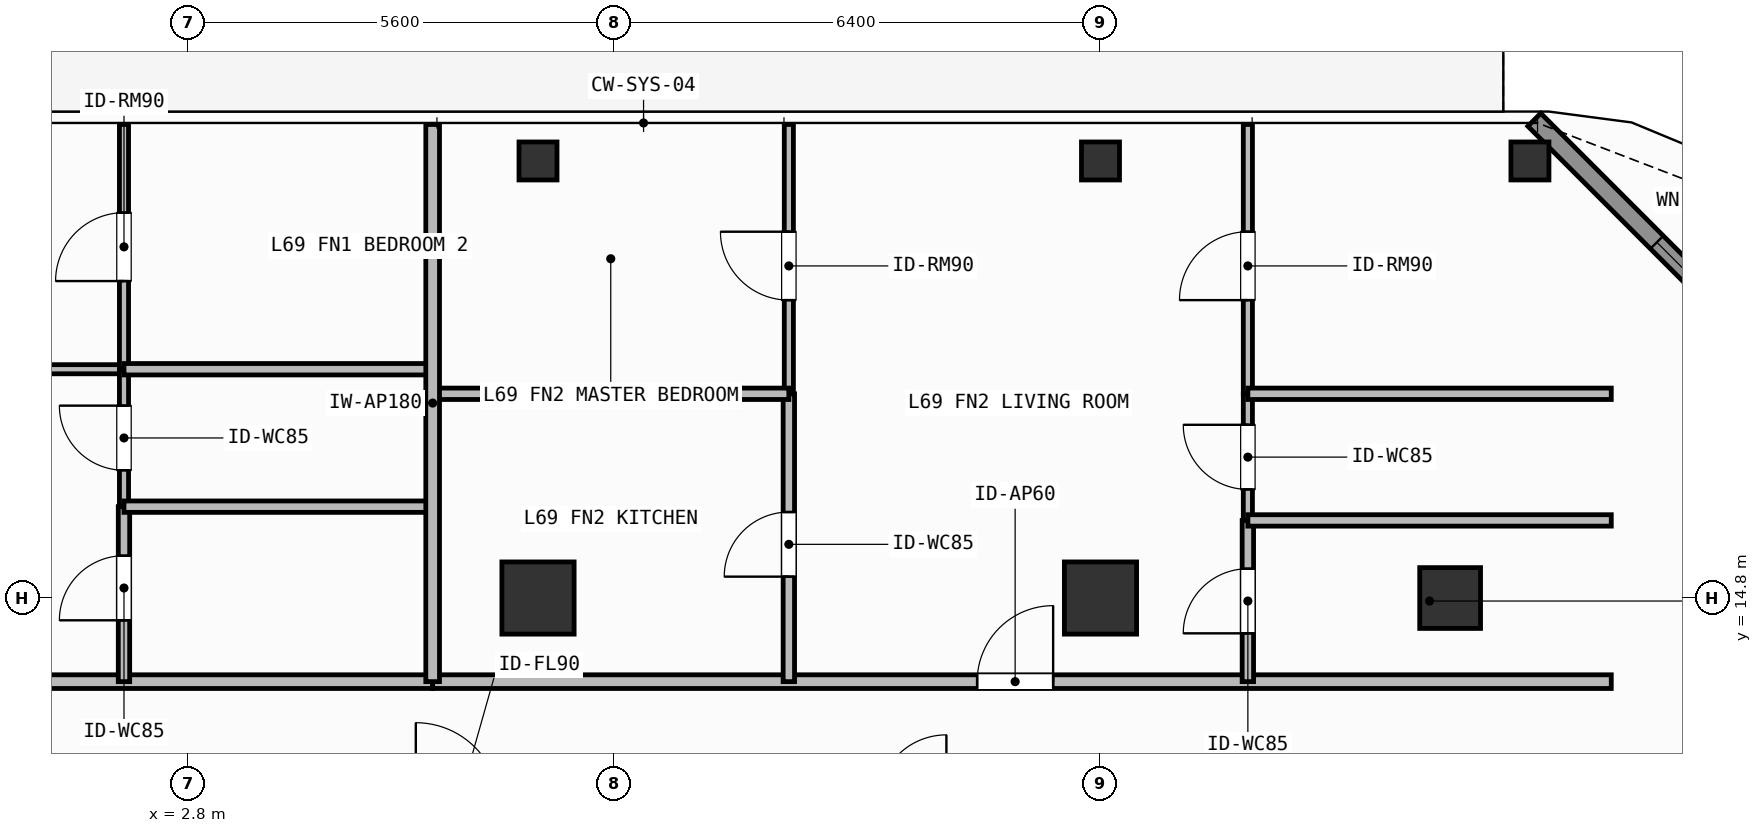
"""IFC4 building model, lengths in metres.
Left out: names, types, materials, properties, quantities, classifications, styles, units other than length and angle.
Written with IfcOpenShell. Run it as: python <this file> out.ifc"""

import sys

from ifc_helpers import new_model, si_unit, direction, frame, frame_2d, origin, origin_2d, place, context, subcontext, project, spatial, rectangle, hollow_rectangle, extrude, element, fill, save


model = new_model("IFC4")
c1 = context("Model", 3, precision=1e-05, world=origin(), true_north=direction((0.0, 1.0)))
c2 = subcontext(c1, "Body", "Model", "MODEL_VIEW")
j1 = project(units=[si_unit("LENGTHUNIT", "METRE"), si_unit("PLANEANGLEUNIT", "RADIAN")], contexts=[c1])
p1 = place(None, origin())
s1 = spatial("IfcSite", under=j1, at=p1, CompositionType="ELEMENT")
p2 = place(p1, origin())
s2 = spatial("IfcBuilding", under=s1, at=p2, CompositionType="ELEMENT")
p3 = place(p2, frame((0.0, 0.0, 282.0)))
s3 = spatial("IfcBuildingStorey", under=s2, at=p3, CompositionType="ELEMENT", Elevation=282.0)
for number, where, z_axis, x_axis in (
    (1, (7.4, 14.8, 0.0), (0.0, 0.0, 1.0), (1.0, 0.0, 0.0)),
    (2, (14.8, 14.8, 0.0), (0.0, 0.0, 1.0), (1.0, 0.0, 0.0)),
):
    element("IfcColumn", number, at=place(p3, frame(where, z_axis=z_axis, x_axis=x_axis)), inside=s3, PredefinedType="COLUMN", context=c2, shape_type="SweptSolid", body=[
        extrude(rectangle(XDim=0.95, YDim=0.95, at=origin_2d()), origin(), (0.0, 0.0, 1.0), 3.9),
    ])
p4 = place(p3, frame((19.4, 14.8, 0.0), z_axis=(0.0, 0.0, 1.0), x_axis=(1.0, 0.0, 0.0)))
e3 = element("IfcColumn", 3, at=p4, inside=s3, PredefinedType="COLUMN", context=c2, shape_type="SweptSolid", body=[
    extrude(hollow_rectangle(XDim=0.8, YDim=0.8, WallThickness=0.036, at=origin_2d()), origin(), (0.0, 0.0, 1.0), 3.9),
])
for number, where, z_axis, x_axis in (
    (4, (20.45, 20.55, 0.0), (0.0, 0.0, 1.0), (1.0, 0.0, 0.0)),
    (5, (7.4, 20.55, 0.0), (0.0, 0.0, 1.0), (1.0, 0.0, 0.0)),
    (6, (14.8, 20.55, 0.0), (0.0, 0.0, 1.0), (1.0, 0.0, 0.0)),
):
    element("IfcColumn", number, at=place(p3, frame(where, z_axis=z_axis, x_axis=x_axis)), inside=s3, PredefinedType="COLUMN", context=c2, shape_type="SweptSolid", body=[
        extrude(hollow_rectangle(XDim=0.5, YDim=0.5, WallThickness=0.025, at=origin_2d()), origin(), (0.0, 0.0, 1.0), 3.9),
    ])
p5 = place(p3, frame((20.508, 21.092, 0.0), z_axis=(0.0, 0.0, 1.0), x_axis=(0.707126925818, -0.707086635981, 0.0)))
e7 = element("IfcWall", 7, at=p5, inside=s3, PredefinedType="SOLIDWALL", context=c2, shape_type="SweptSolid", body=[
    extrude(rectangle(XDim=6.06, YDim=0.24, at=frame_2d((3.03, 0.0))), origin(), (0.0, 0.0, 1.0), 3.62),
])
p6 = place(p5, frame((2.28, 0.0, 0.8)))
e8 = element("IfcOpeningElement", 8, at=p6, cuts=e7, PredefinedType="OPENING", context=c2, shape_type="SweptSolid", body=[
    extrude(rectangle(XDim=1.5, YDim=1.85, at=frame_2d((0.75, 0.925))), frame((0.0, 0.13, 0.0), z_axis=(0.0, -1.0, 0.0), x_axis=(1.0, 0.0, 0.0)), (0.0, 0.0, 1.0), 0.26),
])
p7 = place(p3, frame((-13.72, 13.7, 0.0), z_axis=(0.0, 0.0, 1.0), x_axis=(1.0, 0.0, 0.0)))
e9 = element("IfcWall", 9, at=p7, inside=s3, PredefinedType="PARTITIONING", context=c2, shape_type="SweptSolid", body=[
    extrude(rectangle(XDim=19.734, YDim=0.18, at=frame_2d((9.867, 0.0))), origin(), (0.0, 0.0, 1.0), 3.62),
])
p8 = place(p7, frame((9.456, 0.0, 0.0)))
e10 = element("IfcOpeningElement", 10, at=p8, cuts=e9, PredefinedType="OPENING", context=c2, shape_type="SweptSolid", body=[
    extrude(rectangle(XDim=1.0, YDim=2.2, at=frame_2d((0.5, 1.1))), frame((0.0, 0.1, 0.0), z_axis=(0.0, -1.0, 0.0), x_axis=(1.0, 0.0, 0.0)), (0.0, 0.0, 1.0), 0.2),
])
p9 = place(p3, frame((-9.34, 17.81, 0.0), z_axis=(0.0, 0.0, 1.0), x_axis=(1.0, 0.0, 0.0)))
e11 = element("IfcWall", 11, at=p9, inside=s3, PredefinedType="PARTITIONING", context=c2, shape_type="SweptSolid", body=[
    extrude(rectangle(XDim=11.293, YDim=0.12, at=frame_2d((5.646, 0.0))), origin(), (0.0, 0.0, 1.0), 3.62),
])
p10 = place(p9, frame((5.197, 0.0, 0.0)))
e12 = element("IfcOpeningElement", 12, at=p10, cuts=e11, PredefinedType="OPENING", context=c2, shape_type="SweptSolid", body=[
    extrude(rectangle(XDim=0.9, YDim=2.1, at=frame_2d((0.45, 1.05))), frame((0.0, 0.07, 0.0), z_axis=(0.0, -1.0, 0.0), x_axis=(1.0, 0.0, 0.0)), (0.0, 0.0, 1.0), 0.14),
])
p11 = place(p3, frame((1.953, 13.7, 0.0), z_axis=(0.0, 0.0, 1.0), x_axis=(0.0, 1.0, 0.0)))
e13 = element("IfcWall", 13, at=p11, inside=s3, PredefinedType="PARTITIONING", context=c2, shape_type="SweptSolid", body=[
    extrude(rectangle(XDim=2.302, YDim=0.15, at=frame_2d((1.151, 0.0))), origin(), (0.0, 0.0, 1.0), 3.62),
])
p12 = place(p11, frame((0.807, 0.0, 0.0)))
e14 = element("IfcOpeningElement", 14, at=p12, cuts=e13, PredefinedType="OPENING", context=c2, shape_type="SweptSolid", body=[
    extrude(rectangle(XDim=0.85, YDim=2.1, at=frame_2d((0.425, 1.05))), frame((0.0, 0.085, 0.0), z_axis=(0.0, -1.0, 0.0), x_axis=(1.0, 0.0, 0.0)), (0.0, 0.0, 1.0), 0.17),
])
p13 = place(p3, frame((1.953, 16.002, 0.0), z_axis=(0.0, 0.0, 1.0), x_axis=(0.0, 1.0, 0.0)))
e15 = element("IfcWall", 15, at=p13, inside=s3, PredefinedType="PARTITIONING", context=c2, shape_type="SweptSolid", body=[
    extrude(rectangle(XDim=1.808, YDim=0.12, at=frame_2d((0.904, 0.0))), origin(), (0.0, 0.0, 1.0), 3.62),
])
p14 = place(p13, frame((0.479, 0.0, 0.0)))
e16 = element("IfcOpeningElement", 16, at=p14, cuts=e15, PredefinedType="OPENING", context=c2, shape_type="SweptSolid", body=[
    extrude(rectangle(XDim=0.85, YDim=2.1, at=frame_2d((0.425, 1.05))), frame((0.0, 0.07, 0.0), z_axis=(0.0, -1.0, 0.0), x_axis=(1.0, 0.0, 0.0)), (0.0, 0.0, 1.0), 0.14),
])
p15 = place(p3, frame((1.953, 17.81, 0.0), z_axis=(0.0, 0.0, 1.0), x_axis=(0.0, 1.0, 0.0)))
e17 = element("IfcWall", 17, at=p15, inside=s3, PredefinedType="PARTITIONING", context=c2, shape_type="SweptSolid", body=[
    extrude(rectangle(XDim=3.22, YDim=0.12, at=frame_2d((1.61, 0.0))), origin(), (0.0, 0.0, 1.0), 3.62),
])
p16 = place(p15, frame((1.16, 0.0, 0.0)))
e18 = element("IfcOpeningElement", 18, at=p16, cuts=e17, PredefinedType="OPENING", context=c2, shape_type="SweptSolid", body=[
    extrude(rectangle(XDim=0.9, YDim=2.1, at=frame_2d((0.45, 1.05))), frame((0.0, 0.07, 0.0), z_axis=(0.0, -1.0, 0.0), x_axis=(1.0, 0.0, 0.0)), (0.0, 0.0, 1.0), 0.14),
])
p17 = place(p3, frame((6.014, 13.7, 0.0), z_axis=(0.0, 0.0, 1.0), x_axis=(1.0, 0.0, 0.0)))
e19 = element("IfcWall", 19, at=p17, inside=s3, PredefinedType="PARTITIONING", context=c2, shape_type="SweptSolid", body=[
    extrude(rectangle(XDim=15.506, YDim=0.18, at=frame_2d((7.753, 0.0))), origin(), (0.0, 0.0, 1.0), 3.62),
])
p18 = place(p17, frame((7.163, 0.0, 0.0)))
e20 = element("IfcOpeningElement", 20, at=p18, cuts=e19, PredefinedType="OPENING", context=c2, shape_type="SweptSolid", body=[
    extrude(rectangle(XDim=1.0, YDim=2.2, at=frame_2d((0.5, 1.1))), frame((0.0, 0.1, 0.0), z_axis=(0.0, -1.0, 0.0), x_axis=(1.0, 0.0, 0.0)), (0.0, 0.0, 1.0), 0.2),
])
p19 = place(p3, frame((10.7, 13.7, 0.0), z_axis=(0.0, 0.0, 1.0), x_axis=(0.0, 1.0, 0.0)))
e21 = element("IfcWall", 21, at=p19, inside=s3, PredefinedType="PARTITIONING", context=c2, shape_type="SweptSolid", body=[
    extrude(rectangle(XDim=3.787, YDim=0.15, at=frame_2d((1.894, 0.0))), origin(), (0.0, 0.0, 1.0), 3.62),
])
p20 = place(p19, frame((1.381, 0.0, 0.0)))
e22 = element("IfcOpeningElement", 22, at=p20, cuts=e21, PredefinedType="OPENING", context=c2, shape_type="SweptSolid", body=[
    extrude(rectangle(XDim=0.85, YDim=2.1, at=frame_2d((0.425, 1.05))), frame((0.0, 0.085, 0.0), z_axis=(0.0, -1.0, 0.0), x_axis=(1.0, 0.0, 0.0)), (0.0, 0.0, 1.0), 0.17),
])
p21 = place(p3, frame((10.7, 17.487, 0.0), z_axis=(0.0, 0.0, 1.0), x_axis=(0.0, 1.0, 0.0)))
e23 = element("IfcWall", 23, at=p21, inside=s3, PredefinedType="PARTITIONING", context=c2, shape_type="SweptSolid", body=[
    extrude(rectangle(XDim=3.543, YDim=0.12, at=frame_2d((1.771, 0.0))), origin(), (0.0, 0.0, 1.0), 3.62),
])
p22 = place(p21, frame((1.232, 0.0, 0.0)))
e24 = element("IfcOpeningElement", 24, at=p22, cuts=e23, PredefinedType="OPENING", context=c2, shape_type="SweptSolid", body=[
    extrude(rectangle(XDim=0.9, YDim=2.1, at=frame_2d((0.45, 1.05))), frame((0.0, 0.07, 0.0), z_axis=(0.0, -1.0, 0.0), x_axis=(1.0, 0.0, 0.0)), (0.0, 0.0, 1.0), 0.14),
])
p23 = place(p3, frame((16.739, 13.7, 0.0), z_axis=(0.0, 0.0, 1.0), x_axis=(0.0, 1.0, 0.0)))
e25 = element("IfcWall", 25, at=p23, inside=s3, PredefinedType="PARTITIONING", context=c2, shape_type="SweptSolid", body=[
    extrude(rectangle(XDim=2.121, YDim=0.15, at=frame_2d((1.061, 0.0))), origin(), (0.0, 0.0, 1.0), 3.62),
])
p24 = place(p23, frame((0.635, 0.0, 0.0)))
e26 = element("IfcOpeningElement", 26, at=p24, cuts=e25, PredefinedType="OPENING", context=c2, shape_type="SweptSolid", body=[
    extrude(rectangle(XDim=0.85, YDim=2.1, at=frame_2d((0.425, 1.05))), frame((0.0, 0.085, 0.0), z_axis=(0.0, -1.0, 0.0), x_axis=(1.0, 0.0, 0.0)), (0.0, 0.0, 1.0), 0.17),
])
p25 = place(p3, frame((16.739, 15.821, 0.0), z_axis=(0.0, 0.0, 1.0), x_axis=(0.0, 1.0, 0.0)))
e27 = element("IfcWall", 27, at=p25, inside=s3, PredefinedType="PARTITIONING", context=c2, shape_type="SweptSolid", body=[
    extrude(rectangle(XDim=1.666, YDim=0.12, at=frame_2d((0.833, 0.0))), origin(), (0.0, 0.0, 1.0), 3.62),
])
p26 = place(p25, frame((0.408, 0.0, 0.0)))
e28 = element("IfcOpeningElement", 28, at=p26, cuts=e27, PredefinedType="OPENING", context=c2, shape_type="SweptSolid", body=[
    extrude(rectangle(XDim=0.85, YDim=2.1, at=frame_2d((0.425, 1.05))), frame((0.0, 0.07, 0.0), z_axis=(0.0, -1.0, 0.0), x_axis=(1.0, 0.0, 0.0)), (0.0, 0.0, 1.0), 0.14),
])
p27 = place(p3, frame((16.739, 17.487, 0.0), z_axis=(0.0, 0.0, 1.0), x_axis=(0.0, 1.0, 0.0)))
e29 = element("IfcWall", 29, at=p27, inside=s3, PredefinedType="PARTITIONING", context=c2, shape_type="SweptSolid", body=[
    extrude(rectangle(XDim=3.543, YDim=0.12, at=frame_2d((1.771, 0.0))), origin(), (0.0, 0.0, 1.0), 3.62),
])
p28 = place(p27, frame((1.232, 0.0, 0.0)))
e30 = element("IfcOpeningElement", 30, at=p28, cuts=e29, PredefinedType="OPENING", context=c2, shape_type="SweptSolid", body=[
    extrude(rectangle(XDim=0.9, YDim=2.1, at=frame_2d((0.45, 1.05))), frame((0.0, 0.07, 0.0), z_axis=(0.0, -1.0, 0.0), x_axis=(1.0, 0.0, 0.0)), (0.0, 0.0, 1.0), 0.14),
])
for number, where, z_axis, x_axis in (
    (31, (1.953, 16.002, 0.0), (0.0, 0.0, 1.0), (1.0, 0.0, 0.0)),
    (32, (1.953, 17.81, 0.0), (0.0, 0.0, 1.0), (1.0, 0.0, 0.0)),
):
    element("IfcWall", number, at=place(p3, frame(where, z_axis=z_axis, x_axis=x_axis)), inside=s3, PredefinedType="PARTITIONING", context=c2, shape_type="SweptSolid", body=[
        extrude(rectangle(XDim=4.061, YDim=0.15, at=frame_2d((2.031, 0.0))), origin(), (0.0, 0.0, 1.0), 3.62),
    ])
p29 = place(p3, frame((6.014, 17.487, 0.0), z_axis=(0.0, 0.0, 1.0), x_axis=(1.0, 0.0, 0.0)))
e33 = element("IfcWall", 33, at=p29, inside=s3, PredefinedType="PARTITIONING", context=c2, shape_type="SweptSolid", body=[
    extrude(rectangle(XDim=4.686, YDim=0.15, at=frame_2d((2.343, 0.0))), origin(), (0.0, 0.0, 1.0), 3.62),
])
for number, where, z_axis, x_axis in (
    (34, (16.739, 15.821, 0.0), (0.0, 0.0, 1.0), (1.0, 0.0, 0.0)),
    (35, (16.739, 17.487, 0.0), (0.0, 0.0, 1.0), (1.0, 0.0, 0.0)),
):
    element("IfcWall", number, at=place(p3, frame(where, z_axis=z_axis, x_axis=x_axis)), inside=s3, PredefinedType="PARTITIONING", context=c2, shape_type="SweptSolid", body=[
        extrude(rectangle(XDim=4.781, YDim=0.15, at=frame_2d((2.391, 0.0))), origin(), (0.0, 0.0, 1.0), 3.62),
    ])
p30 = place(p3, frame((6.014, 13.7, 0.0), z_axis=(0.0, 0.0, 1.0), x_axis=(0.0, 1.0, 0.0)))
e36 = element("IfcWall", 36, at=p30, inside=s3, PredefinedType="PARTITIONING", context=c2, shape_type="SweptSolid", body=[
    extrude(rectangle(XDim=7.33, YDim=0.18, at=frame_2d((3.665, 0.0))), origin(), (0.0, 0.0, 1.0), 3.62),
])
p31 = place(p6, origin())
e37 = element("IfcWindow", 37, at=p31, inside=s3, PartitioningType="SINGLE_PANEL", PredefinedType="WINDOW", context=c2, shape_type="SweptSolid", body=[
    extrude(rectangle(XDim=1.5, YDim=1.85, at=frame_2d((0.75, 0.925))), frame((0.0, 0.03, 0.0), z_axis=(0.0, -1.0, 0.0), x_axis=(1.0, 0.0, 0.0)), (0.0, 0.0, 1.0), 0.06),
])
fill(e8, e37)
p32 = place(p12, origin())
e38 = element("IfcDoor", 38, at=p32, inside=s3, OperationType="SINGLE_SWING_LEFT", PredefinedType="DOOR", context=c2, shape_type="SweptSolid", body=[
    extrude(rectangle(XDim=0.85, YDim=2.1, at=frame_2d((0.425, 1.05))), frame((0.0, 0.025, 0.0), z_axis=(0.0, -1.0, 0.0), x_axis=(1.0, 0.0, 0.0)), (0.0, 0.0, 1.0), 0.05),
])
fill(e14, e38)
p33 = place(p14, origin())
e39 = element("IfcDoor", 39, at=p33, inside=s3, OperationType="SINGLE_SWING_RIGHT", PredefinedType="DOOR", context=c2, shape_type="SweptSolid", body=[
    extrude(rectangle(XDim=0.85, YDim=2.1, at=frame_2d((0.425, 1.05))), frame((0.0, 0.025, 0.0), z_axis=(0.0, -1.0, 0.0), x_axis=(1.0, 0.0, 0.0)), (0.0, 0.0, 1.0), 0.05),
])
fill(e16, e39)
p34 = place(p16, origin())
e40 = element("IfcDoor", 40, at=p34, inside=s3, OperationType="SINGLE_SWING_LEFT", PredefinedType="DOOR", context=c2, shape_type="SweptSolid", body=[
    extrude(rectangle(XDim=0.9, YDim=2.1, at=frame_2d((0.45, 1.05))), frame((0.0, 0.025, 0.0), z_axis=(0.0, -1.0, 0.0), x_axis=(1.0, 0.0, 0.0)), (0.0, 0.0, 1.0), 0.05),
])
fill(e18, e40)
p35 = place(p18, origin())
e41 = element("IfcDoor", 41, at=p35, inside=s3, OperationType="SINGLE_SWING_RIGHT", PredefinedType="DOOR", context=c2, shape_type="SweptSolid", body=[
    extrude(rectangle(XDim=1.0, YDim=2.2, at=frame_2d((0.5, 1.1))), frame((0.0, 0.025, 0.0), z_axis=(0.0, -1.0, 0.0), x_axis=(1.0, 0.0, 0.0)), (0.0, 0.0, 1.0), 0.05),
])
fill(e20, e41)
p36 = place(p20, origin())
e42 = element("IfcDoor", 42, at=p36, inside=s3, OperationType="SINGLE_SWING_LEFT", PredefinedType="DOOR", context=c2, shape_type="SweptSolid", body=[
    extrude(rectangle(XDim=0.85, YDim=2.1, at=frame_2d((0.425, 1.05))), frame((0.0, 0.025, 0.0), z_axis=(0.0, -1.0, 0.0), x_axis=(1.0, 0.0, 0.0)), (0.0, 0.0, 1.0), 0.05),
])
fill(e22, e42)
p37 = place(p22, origin())
e43 = element("IfcDoor", 43, at=p37, inside=s3, OperationType="SINGLE_SWING_RIGHT", PredefinedType="DOOR", context=c2, shape_type="SweptSolid", body=[
    extrude(rectangle(XDim=0.9, YDim=2.1, at=frame_2d((0.45, 1.05))), frame((0.0, 0.025, 0.0), z_axis=(0.0, -1.0, 0.0), x_axis=(1.0, 0.0, 0.0)), (0.0, 0.0, 1.0), 0.05),
])
fill(e24, e43)
p38 = place(p24, origin())
e44 = element("IfcDoor", 44, at=p38, inside=s3, OperationType="SINGLE_SWING_LEFT", PredefinedType="DOOR", context=c2, shape_type="SweptSolid", body=[
    extrude(rectangle(XDim=0.85, YDim=2.1, at=frame_2d((0.425, 1.05))), frame((0.0, 0.025, 0.0), z_axis=(0.0, -1.0, 0.0), x_axis=(1.0, 0.0, 0.0)), (0.0, 0.0, 1.0), 0.05),
])
fill(e26, e44)
p39 = place(p26, origin())
e45 = element("IfcDoor", 45, at=p39, inside=s3, OperationType="SINGLE_SWING_RIGHT", PredefinedType="DOOR", context=c2, shape_type="SweptSolid", body=[
    extrude(rectangle(XDim=0.85, YDim=2.1, at=frame_2d((0.425, 1.05))), frame((0.0, 0.025, 0.0), z_axis=(0.0, -1.0, 0.0), x_axis=(1.0, 0.0, 0.0)), (0.0, 0.0, 1.0), 0.05),
])
fill(e28, e45)
p40 = place(p28, origin())
e46 = element("IfcDoor", 46, at=p40, inside=s3, OperationType="SINGLE_SWING_LEFT", PredefinedType="DOOR", context=c2, shape_type="SweptSolid", body=[
    extrude(rectangle(XDim=0.9, YDim=2.1, at=frame_2d((0.45, 1.05))), frame((0.0, 0.025, 0.0), z_axis=(0.0, -1.0, 0.0), x_axis=(1.0, 0.0, 0.0)), (0.0, 0.0, 1.0), 0.05),
])
fill(e30, e46)
save(model, sys.argv[1])
